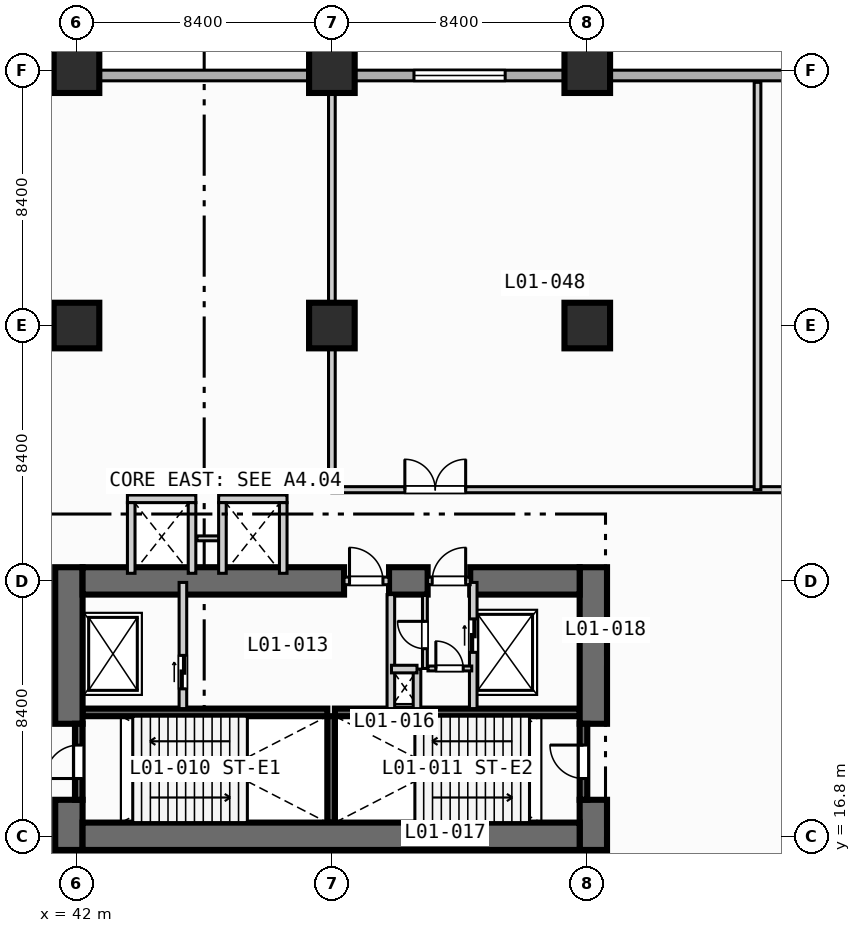
"""IFC4 building model, lengths in metres.
Left out: names, types, materials, properties, quantities, classifications, styles, units other than length and angle.
Written with IfcOpenShell. Run it as: python <this file> out.ifc"""

import sys

from ifc_helpers import new_model, si_unit, direction, frame, frame_2d, origin, origin_2d, place, context, subcontext, project, spatial, rectangle, extrude, element, fill, save


model = new_model("IFC4")
c1 = context("Model", 3, precision=1e-05, world=origin(), true_north=direction((0.0, 1.0)))
c2 = subcontext(c1, "Body", "Model", "MODEL_VIEW")
j1 = project(units=[si_unit("LENGTHUNIT", "METRE"), si_unit("PLANEANGLEUNIT", "RADIAN")], contexts=[c1])
p1 = place(None, origin())
s1 = spatial("IfcSite", under=j1, at=p1, CompositionType="ELEMENT")
p2 = place(p1, origin())
s2 = spatial("IfcBuilding", under=s1, at=p2, CompositionType="ELEMENT")
p3 = place(p2, frame((0.0, 0.0, 6.0)))
s3 = spatial("IfcBuildingStorey", under=s2, at=p3, CompositionType="ELEMENT", Elevation=6.0)
for number, where, z_axis, x_axis in (
    (1, (42.2, 20.875, 0.0), (0.0, 0.0, 1.0), (1.0, 0.0, 0.0)),
    (2, (50.5, 20.875, 0.0), (0.0, 0.0, 1.0), (1.0, 0.0, 0.0)),
):
    element("IfcWall", number, at=place(p3, frame(where, z_axis=z_axis, x_axis=x_axis)), inside=s3, PredefinedType="SOLIDWALL", context=c2, shape_type="SweptSolid", body=[
        extrude(rectangle(XDim=8.05, YDim=0.25, at=frame_2d((4.025, 0.0))), origin(), (0.0, 0.0, 1.0), 4.45),
    ])
p4 = place(p3, frame((50.375, 17.25, 0.0), z_axis=(0.0, 0.0, 1.0), x_axis=(0.0, 1.0, 0.0)))
e3 = element("IfcWall", 3, at=p4, inside=s3, PredefinedType="SOLIDWALL", context=c2, shape_type="SweptSolid", body=[
    extrude(rectangle(XDim=3.5, YDim=0.25, at=frame_2d((1.75, 0.0))), origin(), (0.0, 0.0, 1.0), 4.45),
])
p5 = place(p3, frame((41.75, 16.35, 0.0), z_axis=(0.0, 0.0, 1.0), x_axis=(0.0, 1.0, 0.0)))
e4 = element("IfcWall", 4, at=p5, inside=s3, PredefinedType="SHEAR", context=c2, shape_type="SweptSolid", body=[
    extrude(rectangle(XDim=1.65, YDim=0.9, at=frame_2d((0.825, 0.0))), origin(), (0.0, 0.0, 1.0), 4.45),
])
p6 = place(p3, frame((41.75, 20.5, 0.0), z_axis=(0.0, 0.0, 1.0), x_axis=(0.0, 1.0, 0.0)))
e5 = element("IfcWall", 5, at=p6, inside=s3, PredefinedType="SHEAR", context=c2, shape_type="SweptSolid", body=[
    extrude(rectangle(XDim=5.15, YDim=0.9, at=frame_2d((2.575, 0.0))), origin(), (0.0, 0.0, 1.0), 4.45),
])
p7 = place(p3, frame((59.0, 16.35, 0.0), z_axis=(0.0, 0.0, 1.0), x_axis=(0.0, 1.0, 0.0)))
e6 = element("IfcWall", 6, at=p7, inside=s3, PredefinedType="SHEAR", context=c2, shape_type="SweptSolid", body=[
    extrude(rectangle(XDim=1.65, YDim=0.9, at=frame_2d((0.825, 0.0))), origin(), (0.0, 0.0, 1.0), 4.45),
])
p8 = place(p3, frame((59.0, 20.5, 0.0), z_axis=(0.0, 0.0, 1.0), x_axis=(0.0, 1.0, 0.0)))
e7 = element("IfcWall", 7, at=p8, inside=s3, PredefinedType="SHEAR", context=c2, shape_type="SweptSolid", body=[
    extrude(rectangle(XDim=5.15, YDim=0.9, at=frame_2d((2.575, 0.0))), origin(), (0.0, 0.0, 1.0), 4.45),
])
p9 = place(p3, frame((42.2, 16.8, 0.0), z_axis=(0.0, 0.0, 1.0), x_axis=(1.0, 0.0, 0.0)))
e8 = element("IfcWall", 8, at=p9, inside=s3, PredefinedType="SHEAR", context=c2, shape_type="SweptSolid", body=[
    extrude(rectangle(XDim=16.35, YDim=0.9, at=frame_2d((8.175, 0.0))), origin(), (0.0, 0.0, 1.0), 4.45),
])
p10 = place(p3, frame((42.2, 25.2, 0.0), z_axis=(0.0, 0.0, 1.0), x_axis=(1.0, 0.0, 0.0)))
e9 = element("IfcWall", 9, at=p10, inside=s3, PredefinedType="SHEAR", context=c2, shape_type="SweptSolid", body=[
    extrude(rectangle(XDim=8.6, YDim=0.9, at=frame_2d((4.3, 0.0))), origin(), (0.0, 0.0, 1.0), 4.45),
])
p11 = place(p3, frame((52.28, 25.2, 0.0), z_axis=(0.0, 0.0, 1.0), x_axis=(1.0, 0.0, 0.0)))
e10 = element("IfcWall", 10, at=p11, inside=s3, PredefinedType="SHEAR", context=c2, shape_type="SweptSolid", body=[
    extrude(rectangle(XDim=1.27, YDim=0.9, at=frame_2d((0.635, 0.0))), origin(), (0.0, 0.0, 1.0), 4.45),
])
p12 = place(p3, frame((54.95, 25.2, 0.0), z_axis=(0.0, 0.0, 1.0), x_axis=(1.0, 0.0, 0.0)))
e11 = element("IfcWall", 11, at=p12, inside=s3, PredefinedType="SHEAR", context=c2, shape_type="SweptSolid", body=[
    extrude(rectangle(XDim=3.6, YDim=0.9, at=frame_2d((1.8, 0.0))), origin(), (0.0, 0.0, 1.0), 4.45),
])
for number, where, z_axis, x_axis in (
    (12, (42.0, 33.6, 0.0), (0.0, 0.0, 1.0), (1.0, 0.0, 0.0)),
    (13, (42.0, 42.0, 0.0), (0.0, 0.0, 1.0), (1.0, 0.0, 0.0)),
    (14, (50.4, 33.6, 0.0), (0.0, 0.0, 1.0), (1.0, 0.0, 0.0)),
    (15, (50.4, 42.0, 0.0), (0.0, 0.0, 1.0), (1.0, 0.0, 0.0)),
    (16, (58.8, 33.6, 0.0), (0.0, 0.0, 1.0), (1.0, 0.0, 0.0)),
    (17, (58.8, 42.0, 0.0), (0.0, 0.0, 1.0), (1.0, 0.0, 0.0)),
):
    element("IfcColumn", number, at=place(p3, frame(where, z_axis=z_axis, x_axis=x_axis)), inside=s3, PredefinedType="COLUMN", context=c2, shape_type="SweptSolid", body=[
        extrude(rectangle(XDim=1.5, YDim=1.5, at=origin_2d()), origin(), (0.0, 0.0, 1.0), 4.8),
    ])
p13 = place(p3, frame((41.825, 89.225, 0.0), z_axis=(0.0, 0.0, 1.0), x_axis=(0.0, -1.0, 0.0)))
e18 = element("IfcWall", 18, at=p13, inside=s3, PredefinedType="STANDARD", context=c2, shape_type="SweptSolid", body=[
    extrude(rectangle(XDim=47.4, YDim=0.35, at=frame_2d((23.7, 0.0))), origin(), (0.0, 0.0, 1.0), 4.45),
])
p14 = place(p13, frame((33.125, 0.0, 0.85)))
e19 = element("IfcOpeningElement", 19, at=p14, cuts=e18, PredefinedType="OPENING", context=c2, shape_type="SweptSolid", body=[
    extrude(rectangle(XDim=3.0, YDim=2.4, at=frame_2d((1.5, 1.2))), frame((0.0, 0.185, 0.0), z_axis=(0.0, -1.0, 0.0), x_axis=(1.0, 0.0, 0.0)), (0.0, 0.0, 1.0), 0.37),
])
p15 = place(p13, frame((16.325, 0.0, 0.85)))
e20 = element("IfcOpeningElement", 20, at=p15, cuts=e18, PredefinedType="OPENING", context=c2, shape_type="SweptSolid", body=[
    extrude(rectangle(XDim=3.0, YDim=2.4, at=frame_2d((1.5, 1.2))), frame((0.0, 0.185, 0.0), z_axis=(0.0, -1.0, 0.0), x_axis=(1.0, 0.0, 0.0)), (0.0, 0.0, 1.0), 0.37),
])
p16 = place(p3, frame((41.825, 41.825, 0.0), z_axis=(0.0, 0.0, 1.0), x_axis=(1.0, 0.0, 0.0)))
e21 = element("IfcWall", 21, at=p16, inside=s3, PredefinedType="STANDARD", context=c2, shape_type="SweptSolid", body=[
    extrude(rectangle(XDim=47.4, YDim=0.35, at=frame_2d((23.7, 0.0))), origin(), (0.0, 0.0, 1.0), 4.45),
])
p17 = place(p16, frame((11.275, 0.0, 0.85)))
e22 = element("IfcOpeningElement", 22, at=p17, cuts=e21, PredefinedType="OPENING", context=c2, shape_type="SweptSolid", body=[
    extrude(rectangle(XDim=3.0, YDim=2.4, at=frame_2d((1.5, 1.2))), frame((0.0, 0.185, 0.0), z_axis=(0.0, -1.0, 0.0), x_axis=(1.0, 0.0, 0.0)), (0.0, 0.0, 1.0), 0.37),
])
p18 = place(p16, frame((28.075, 0.0, 0.85)))
e23 = element("IfcOpeningElement", 23, at=p18, cuts=e21, PredefinedType="OPENING", context=c2, shape_type="SweptSolid", body=[
    extrude(rectangle(XDim=3.0, YDim=2.4, at=frame_2d((1.5, 1.2))), frame((0.0, 0.185, 0.0), z_axis=(0.0, -1.0, 0.0), x_axis=(1.0, 0.0, 0.0)), (0.0, 0.0, 1.0), 0.37),
])
p19 = place(p3, frame((42.075, 18.0, 0.0), z_axis=(0.0, 0.0, 1.0), x_axis=(0.0, 1.0, 0.0)))
e24 = element("IfcWall", 24, at=p19, inside=s3, PredefinedType="SOLIDWALL", context=c2, shape_type="SweptSolid", body=[
    extrude(rectangle(XDim=2.5, YDim=0.25, at=frame_2d((1.25, 0.0))), origin(), (0.0, 0.0, 1.0), 4.45),
])
p20 = place(p19, frame((0.7, 0.0, 0.0)))
e25 = element("IfcOpeningElement", 25, at=p20, cuts=e24, PredefinedType="OPENING", context=c2, shape_type="SweptSolid", body=[
    extrude(rectangle(XDim=1.1, YDim=2.15, at=frame_2d((0.55, 1.075))), frame((0.0, 0.135, 0.0), z_axis=(0.0, -1.0, 0.0), x_axis=(1.0, 0.0, 0.0)), (0.0, 0.0, 1.0), 0.27),
])
p21 = place(p3, frame((58.675, 18.0, 0.0), z_axis=(0.0, 0.0, 1.0), x_axis=(0.0, 1.0, 0.0)))
e26 = element("IfcWall", 26, at=p21, inside=s3, PredefinedType="SOLIDWALL", context=c2, shape_type="SweptSolid", body=[
    extrude(rectangle(XDim=2.5, YDim=0.25, at=frame_2d((1.25, 0.0))), origin(), (0.0, 0.0, 1.0), 4.45),
])
p22 = place(p21, frame((0.7, 0.0, 0.0)))
e27 = element("IfcOpeningElement", 27, at=p22, cuts=e26, PredefinedType="OPENING", context=c2, shape_type="SweptSolid", body=[
    extrude(rectangle(XDim=1.1, YDim=2.15, at=frame_2d((0.55, 1.075))), frame((0.0, 0.135, 0.0), z_axis=(0.0, -1.0, 0.0), x_axis=(1.0, 0.0, 0.0)), (0.0, 0.0, 1.0), 0.27),
])
p23 = place(p3, frame((45.5, 21.0, 0.0), z_axis=(0.0, 0.0, 1.0), x_axis=(0.0, 1.0, 0.0)))
e28 = element("IfcWall", 28, at=p23, inside=s3, PredefinedType="SOLIDWALL", context=c2, shape_type="SweptSolid", body=[
    extrude(rectangle(XDim=4.15, YDim=0.25, at=frame_2d((2.075, 0.0))), origin(), (0.0, 0.0, 1.0), 4.45),
])
p24 = place(p23, frame((0.65, 0.0, 0.0)))
e29 = element("IfcOpeningElement", 29, at=p24, cuts=e28, PredefinedType="OPENING", context=c2, shape_type="SweptSolid", body=[
    extrude(rectangle(XDim=1.1, YDim=2.15, at=frame_2d((0.55, 1.075))), frame((0.0, 0.135, 0.0), z_axis=(0.0, -1.0, 0.0), x_axis=(1.0, 0.0, 0.0)), (0.0, 0.0, 1.0), 0.27),
])
p25 = place(p3, frame((50.8, 25.2, 0.0), z_axis=(0.0, 0.0, 1.0), x_axis=(1.0, 0.0, 0.0)))
e30 = element("IfcWall", 30, at=p25, inside=s3, PredefinedType="SOLIDWALL", context=c2, shape_type="SweptSolid", body=[
    extrude(rectangle(XDim=1.48, YDim=0.25, at=frame_2d((0.74, 0.0))), origin(), (0.0, 0.0, 1.0), 4.45),
])
p26 = place(p25, frame((0.18, 0.0, 0.0)))
e31 = element("IfcOpeningElement", 31, at=p26, cuts=e30, PredefinedType="OPENING", context=c2, shape_type="SweptSolid", body=[
    extrude(rectangle(XDim=1.1, YDim=2.15, at=frame_2d((0.55, 1.075))), frame((0.0, 0.135, 0.0), z_axis=(0.0, -1.0, 0.0), x_axis=(1.0, 0.0, 0.0)), (0.0, 0.0, 1.0), 0.27),
])
p27 = place(p3, frame((52.34, 21.0, 0.0), z_axis=(0.0, 0.0, 1.0), x_axis=(0.0, 1.0, 0.0)))
e32 = element("IfcWall", 32, at=p27, inside=s3, PredefinedType="SOLIDWALL", context=c2, shape_type="SweptSolid", body=[
    extrude(rectangle(XDim=3.75, YDim=0.25, at=frame_2d((1.875, 0.0))), origin(), (0.0, 0.0, 1.0), 4.45),
])
p28 = place(p3, frame((55.05, 21.0, 0.0), z_axis=(0.0, 0.0, 1.0), x_axis=(0.0, 1.0, 0.0)))
e33 = element("IfcWall", 33, at=p28, inside=s3, PredefinedType="SOLIDWALL", context=c2, shape_type="SweptSolid", body=[
    extrude(rectangle(XDim=4.15, YDim=0.25, at=frame_2d((2.075, 0.0))), origin(), (0.0, 0.0, 1.0), 4.45),
])
p29 = place(p28, frame((1.85, 0.0, 0.0)))
e34 = element("IfcOpeningElement", 34, at=p29, cuts=e33, PredefinedType="OPENING", context=c2, shape_type="SweptSolid", body=[
    extrude(rectangle(XDim=1.1, YDim=2.15, at=frame_2d((0.55, 1.075))), frame((0.0, 0.135, 0.0), z_axis=(0.0, -1.0, 0.0), x_axis=(1.0, 0.0, 0.0)), (0.0, 0.0, 1.0), 0.27),
])
p30 = place(p3, frame((53.55, 25.2, 0.0), z_axis=(0.0, 0.0, 1.0), x_axis=(1.0, 0.0, 0.0)))
e35 = element("IfcWall", 35, at=p30, inside=s3, PredefinedType="SOLIDWALL", context=c2, shape_type="SweptSolid", body=[
    extrude(rectangle(XDim=1.4, YDim=0.25, at=frame_2d((0.7, 0.0))), origin(), (0.0, 0.0, 1.0), 4.45),
])
p31 = place(p30, frame((0.15, 0.0, 0.0)))
e36 = element("IfcOpeningElement", 36, at=p31, cuts=e35, PredefinedType="OPENING", context=c2, shape_type="SweptSolid", body=[
    extrude(rectangle(XDim=1.1, YDim=2.15, at=frame_2d((0.55, 1.075))), frame((0.0, 0.135, 0.0), z_axis=(0.0, -1.0, 0.0), x_axis=(1.0, 0.0, 0.0)), (0.0, 0.0, 1.0), 0.27),
])
p32 = place(p3, frame((53.2, 21.0, 0.0), z_axis=(0.0, 0.0, 1.0), x_axis=(0.0, 1.0, 0.0)))
e37 = element("IfcWall", 37, at=p32, inside=s3, PredefinedType="SOLIDWALL", context=c2, shape_type="SweptSolid", body=[
    extrude(rectangle(XDim=1.3, YDim=0.25, at=frame_2d((0.65, 0.0))), origin(), (0.0, 0.0, 1.0), 4.45),
])
p33 = place(p3, frame((52.36, 22.3, 0.0), z_axis=(0.0, 0.0, 1.0), x_axis=(1.0, 0.0, 0.0)))
e38 = element("IfcWall", 38, at=p33, inside=s3, PredefinedType="SOLIDWALL", context=c2, shape_type="SweptSolid", body=[
    extrude(rectangle(XDim=0.84, YDim=0.25, at=frame_2d((0.42, 0.0))), origin(), (0.0, 0.0, 1.0), 4.45),
])
p34 = place(p3, frame((53.56, 22.32, 0.0), z_axis=(0.0, 0.0, 1.0), x_axis=(1.0, 0.0, 0.0)))
e39 = element("IfcWall", 39, at=p34, inside=s3, PredefinedType="PARTITIONING", context=c2, shape_type="SweptSolid", body=[
    extrude(rectangle(XDim=1.44, YDim=0.16, at=frame_2d((0.72, 0.0))), origin(), (0.0, 0.0, 1.0), 4.45),
])
p35 = place(p34, frame((0.26, 0.0, 0.0)))
e40 = element("IfcOpeningElement", 40, at=p35, cuts=e39, PredefinedType="OPENING", context=c2, shape_type="SweptSolid", body=[
    extrude(rectangle(XDim=0.9, YDim=2.1, at=frame_2d((0.45, 1.05))), frame((0.0, 0.09, 0.0), z_axis=(0.0, -1.0, 0.0), x_axis=(1.0, 0.0, 0.0)), (0.0, 0.0, 1.0), 0.18),
])
p36 = place(p3, frame((53.46, 22.32, 0.0), z_axis=(0.0, 0.0, 1.0), x_axis=(0.0, 1.0, 0.0)))
e41 = element("IfcWall", 41, at=p36, inside=s3, PredefinedType="PARTITIONING", context=c2, shape_type="SweptSolid", body=[
    extrude(rectangle(XDim=2.4, YDim=0.16, at=frame_2d((1.2, 0.0))), origin(), (0.0, 0.0, 1.0), 4.45),
])
p37 = place(p36, frame((0.65, 0.0, 0.0)))
e42 = element("IfcOpeningElement", 42, at=p37, cuts=e41, PredefinedType="OPENING", context=c2, shape_type="SweptSolid", body=[
    extrude(rectangle(XDim=0.9, YDim=2.1, at=frame_2d((0.45, 1.05))), frame((0.0, 0.09, 0.0), z_axis=(0.0, -1.0, 0.0), x_axis=(1.0, 0.0, 0.0)), (0.0, 0.0, 1.0), 0.18),
])
p38 = place(p3, frame((43.675, 27.9, 0.0), z_axis=(0.0, 0.0, 1.0), x_axis=(1.0, 0.0, 0.0)))
e43 = element("IfcWall", 43, at=p38, inside=s3, PredefinedType="SOLIDWALL", context=c2, shape_type="SweptSolid", body=[
    extrude(rectangle(XDim=2.25, YDim=0.25, at=frame_2d((1.125, 0.0))), origin(), (0.0, 0.0, 1.0), 4.45),
])
for number, where, z_axis, x_axis in (
    (44, (43.8, 25.45, 0.0), (0.0, 0.0, 1.0), (0.0, 1.0, 0.0)),
    (45, (45.8, 25.45, 0.0), (0.0, 0.0, 1.0), (0.0, 1.0, 0.0)),
):
    element("IfcWall", number, at=place(p3, frame(where, z_axis=z_axis, x_axis=x_axis)), inside=s3, PredefinedType="SOLIDWALL", context=c2, shape_type="SweptSolid", body=[
        extrude(rectangle(XDim=2.325, YDim=0.25, at=frame_2d((1.163, 0.0))), origin(), (0.0, 0.0, 1.0), 4.45),
    ])
p39 = place(p3, frame((45.96, 26.6, 0.0), z_axis=(0.0, 0.0, 1.0), x_axis=(1.0, 0.0, 0.0)))
e46 = element("IfcWall", 46, at=p39, inside=s3, PredefinedType="PARTITIONING", context=c2, shape_type="SweptSolid", body=[
    extrude(rectangle(XDim=0.88, YDim=0.16, at=frame_2d((0.44, 0.0))), origin(), (0.0, 0.0, 1.0), 4.45),
])
p40 = place(p3, frame((46.675, 27.9, 0.0), z_axis=(0.0, 0.0, 1.0), x_axis=(1.0, 0.0, 0.0)))
e47 = element("IfcWall", 47, at=p40, inside=s3, PredefinedType="SOLIDWALL", context=c2, shape_type="SweptSolid", body=[
    extrude(rectangle(XDim=2.25, YDim=0.25, at=frame_2d((1.125, 0.0))), origin(), (0.0, 0.0, 1.0), 4.45),
])
for number, where, z_axis, x_axis in (
    (48, (46.8, 25.45, 0.0), (0.0, 0.0, 1.0), (0.0, 1.0, 0.0)),
    (49, (48.8, 25.45, 0.0), (0.0, 0.0, 1.0), (0.0, 1.0, 0.0)),
):
    element("IfcWall", number, at=place(p3, frame(where, z_axis=z_axis, x_axis=x_axis)), inside=s3, PredefinedType="SOLIDWALL", context=c2, shape_type="SweptSolid", body=[
        extrude(rectangle(XDim=2.325, YDim=0.25, at=frame_2d((1.163, 0.0))), origin(), (0.0, 0.0, 1.0), 4.45),
    ])
p41 = place(p3, frame((50.4, 28.2, 0.0), z_axis=(0.0, 0.0, 1.0), x_axis=(1.0, 0.0, 0.0)))
e50 = element("IfcWall", 50, at=p41, inside=s3, PredefinedType="PARTITIONING", context=c2, shape_type="SweptSolid", body=[
    extrude(rectangle(XDim=38.6, YDim=0.2, at=frame_2d((19.3, 0.0))), origin(), (0.0, 0.0, 1.0), 4.45),
])
p42 = place(p41, frame((2.4, 0.0, 0.0)))
e51 = element("IfcOpeningElement", 51, at=p42, cuts=e50, PredefinedType="OPENING", context=c2, shape_type="SweptSolid", body=[
    extrude(rectangle(XDim=2.0, YDim=2.15, at=frame_2d((1.0, 1.075))), frame((0.0, 0.11, 0.0), z_axis=(0.0, -1.0, 0.0), x_axis=(1.0, 0.0, 0.0)), (0.0, 0.0, 1.0), 0.22),
])
p43 = place(p41, frame((16.4, 0.0, 0.0)))
e52 = element("IfcOpeningElement", 52, at=p43, cuts=e50, PredefinedType="OPENING", context=c2, shape_type="SweptSolid", body=[
    extrude(rectangle(XDim=2.0, YDim=2.15, at=frame_2d((1.0, 1.075))), frame((0.0, 0.11, 0.0), z_axis=(0.0, -1.0, 0.0), x_axis=(1.0, 0.0, 0.0)), (0.0, 0.0, 1.0), 0.22),
])
p44 = place(p41, frame((30.4, 0.0, 0.0)))
e53 = element("IfcOpeningElement", 53, at=p44, cuts=e50, PredefinedType="OPENING", context=c2, shape_type="SweptSolid", body=[
    extrude(rectangle(XDim=2.0, YDim=2.15, at=frame_2d((1.0, 1.075))), frame((0.0, 0.11, 0.0), z_axis=(0.0, -1.0, 0.0), x_axis=(1.0, 0.0, 0.0)), (0.0, 0.0, 1.0), 0.22),
])
p45 = place(p3, frame((50.4, 28.2, 0.0), z_axis=(0.0, 0.0, 1.0), x_axis=(0.0, 1.0, 0.0)))
e54 = element("IfcWall", 54, at=p45, inside=s3, PredefinedType="PARTITIONING", context=c2, shape_type="SweptSolid", body=[
    extrude(rectangle(XDim=13.4, YDim=0.22, at=frame_2d((6.7, 0.0))), origin(), (0.0, 0.0, 1.0), 3.6),
])
p46 = place(p3, frame((64.4, 28.2, 0.0), z_axis=(0.0, 0.0, 1.0), x_axis=(0.0, 1.0, 0.0)))
e55 = element("IfcWall", 55, at=p46, inside=s3, PredefinedType="PARTITIONING", context=c2, shape_type="SweptSolid", body=[
    extrude(rectangle(XDim=13.4, YDim=0.22, at=frame_2d((6.7, 0.0))), origin(), (0.0, 0.0, 1.0), 4.45),
])
p47 = place(p17, origin())
e56 = element("IfcWindow", 56, at=p47, inside=s3, PartitioningType="SINGLE_PANEL", PredefinedType="WINDOW", context=c2, shape_type="SweptSolid", body=[
    extrude(rectangle(XDim=3.0, YDim=2.4, at=frame_2d((1.5, 1.2))), frame((0.0, 0.03, 0.0), z_axis=(0.0, -1.0, 0.0), x_axis=(1.0, 0.0, 0.0)), (0.0, 0.0, 1.0), 0.06),
])
fill(e22, e56)
p48 = place(p20, origin())
e57 = element("IfcDoor", 57, at=p48, inside=s3, OperationType="SINGLE_SWING_LEFT", PredefinedType="DOOR", context=c2, shape_type="SweptSolid", body=[
    extrude(rectangle(XDim=1.1, YDim=2.15, at=frame_2d((0.55, 1.075))), frame((0.0, 0.025, 0.0), z_axis=(0.0, -1.0, 0.0), x_axis=(1.0, 0.0, 0.0)), (0.0, 0.0, 1.0), 0.05),
])
fill(e25, e57)
p49 = place(p22, origin())
e58 = element("IfcDoor", 58, at=p49, inside=s3, OperationType="SINGLE_SWING_RIGHT", PredefinedType="DOOR", context=c2, shape_type="SweptSolid", body=[
    extrude(rectangle(XDim=1.1, YDim=2.15, at=frame_2d((0.55, 1.075))), frame((0.0, 0.025, 0.0), z_axis=(0.0, -1.0, 0.0), x_axis=(1.0, 0.0, 0.0)), (0.0, 0.0, 1.0), 0.05),
])
fill(e27, e58)
p50 = place(p24, origin())
e59 = element("IfcDoor", 59, at=p50, inside=s3, OperationType="SLIDING_TO_LEFT", PredefinedType="DOOR", context=c2, shape_type="SweptSolid", body=[
    extrude(rectangle(XDim=1.1, YDim=2.15, at=frame_2d((0.55, 1.075))), frame((0.0, 0.025, 0.0), z_axis=(0.0, -1.0, 0.0), x_axis=(1.0, 0.0, 0.0)), (0.0, 0.0, 1.0), 0.05),
])
fill(e29, e59)
p51 = place(p26, origin())
e60 = element("IfcDoor", 60, at=p51, inside=s3, OperationType="SINGLE_SWING_LEFT", PredefinedType="DOOR", context=c2, shape_type="SweptSolid", body=[
    extrude(rectangle(XDim=1.1, YDim=2.15, at=frame_2d((0.55, 1.075))), frame((0.0, 0.025, 0.0), z_axis=(0.0, -1.0, 0.0), x_axis=(1.0, 0.0, 0.0)), (0.0, 0.0, 1.0), 0.05),
])
fill(e31, e60)
p52 = place(p29, origin())
e61 = element("IfcDoor", 61, at=p52, inside=s3, OperationType="SLIDING_TO_LEFT", PredefinedType="DOOR", context=c2, shape_type="SweptSolid", body=[
    extrude(rectangle(XDim=1.1, YDim=2.15, at=frame_2d((0.55, 1.075))), frame((0.0, 0.025, 0.0), z_axis=(0.0, -1.0, 0.0), x_axis=(1.0, 0.0, 0.0)), (0.0, 0.0, 1.0), 0.05),
])
fill(e34, e61)
p53 = place(p31, origin())
e62 = element("IfcDoor", 62, at=p53, inside=s3, OperationType="SINGLE_SWING_RIGHT", PredefinedType="DOOR", context=c2, shape_type="SweptSolid", body=[
    extrude(rectangle(XDim=1.1, YDim=2.15, at=frame_2d((0.55, 1.075))), frame((0.0, 0.025, 0.0), z_axis=(0.0, -1.0, 0.0), x_axis=(1.0, 0.0, 0.0)), (0.0, 0.0, 1.0), 0.05),
])
fill(e36, e62)
p54 = place(p35, origin())
e63 = element("IfcDoor", 63, at=p54, inside=s3, OperationType="SINGLE_SWING_LEFT", PredefinedType="DOOR", context=c2, shape_type="SweptSolid", body=[
    extrude(rectangle(XDim=0.9, YDim=2.1, at=frame_2d((0.45, 1.05))), frame((0.0, 0.025, 0.0), z_axis=(0.0, -1.0, 0.0), x_axis=(1.0, 0.0, 0.0)), (0.0, 0.0, 1.0), 0.05),
])
fill(e40, e63)
p55 = place(p37, origin())
e64 = element("IfcDoor", 64, at=p55, inside=s3, OperationType="SINGLE_SWING_RIGHT", PredefinedType="DOOR", context=c2, shape_type="SweptSolid", body=[
    extrude(rectangle(XDim=0.9, YDim=2.1, at=frame_2d((0.45, 1.05))), frame((0.0, 0.025, 0.0), z_axis=(0.0, -1.0, 0.0), x_axis=(1.0, 0.0, 0.0)), (0.0, 0.0, 1.0), 0.05),
])
fill(e42, e64)
p56 = place(p42, origin())
e65 = element("IfcDoor", 65, at=p56, inside=s3, OperationType="SINGLE_SWING_LEFT", PredefinedType="DOOR", context=c2, shape_type="SweptSolid", body=[
    extrude(rectangle(XDim=2.0, YDim=2.15, at=frame_2d((1.0, 1.075))), frame((0.0, 0.025, 0.0), z_axis=(0.0, -1.0, 0.0), x_axis=(1.0, 0.0, 0.0)), (0.0, 0.0, 1.0), 0.05),
])
fill(e51, e65)
save(model, sys.argv[1])
